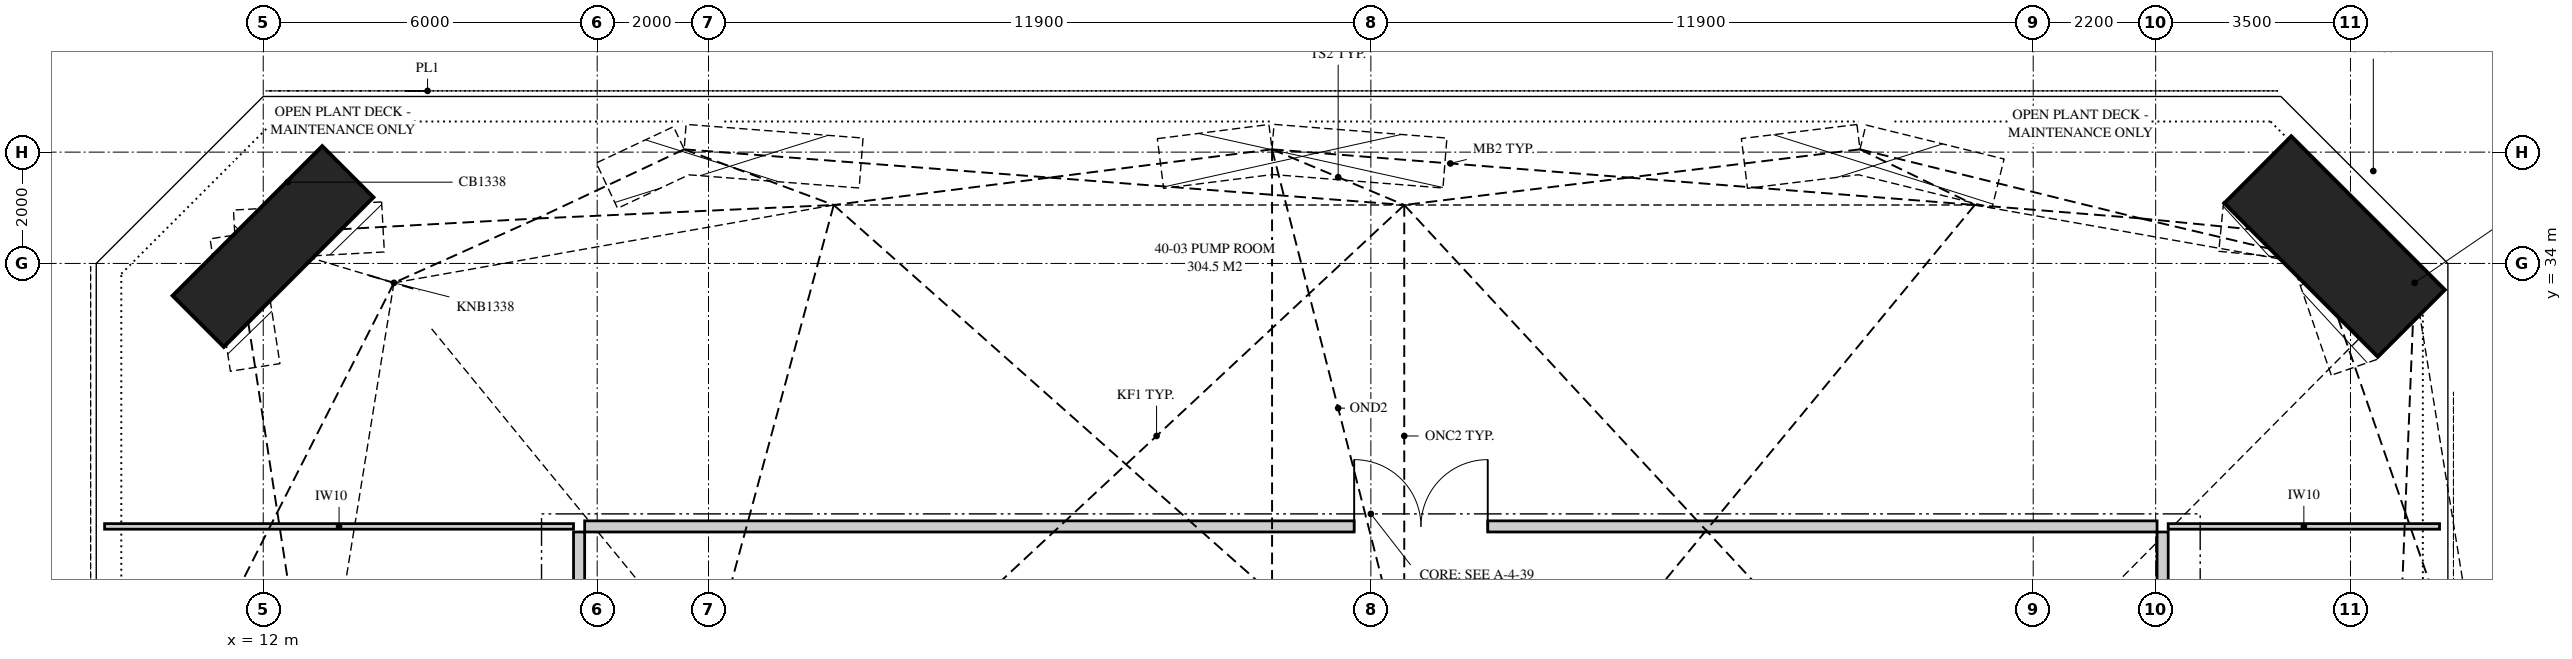
"""IFC4 building model, lengths in metres.
Left out: names, types, materials, properties, quantities, classifications, styles, units other than length and angle.
Written with IfcOpenShell. Run it as: python <this file> out.ifc"""

import sys

from ifc_helpers import new_model, si_unit, direction, frame, frame_2d, origin, origin_2d, place, context, subcontext, project, spatial, polyline, rectangle, hollow_rectangle, outline, extrude, element, fill, save


model = new_model("IFC4")
c1 = context("Model", 3, precision=1e-05, world=origin(), true_north=direction((0.0, 1.0)))
c2 = subcontext(c1, "Body", "Model", "MODEL_VIEW")
j1 = project(units=[si_unit("LENGTHUNIT", "METRE"), si_unit("PLANEANGLEUNIT", "RADIAN")], contexts=[c1])
p1 = place(None, origin())
s1 = spatial("IfcSite", under=j1, at=p1, CompositionType="ELEMENT")
p2 = place(p1, origin())
s2 = spatial("IfcBuilding", under=s1, at=p2, CompositionType="ELEMENT")
p3 = place(p2, frame((0.0, 0.0, 149.35)))
s3 = spatial("IfcBuildingStorey", under=s2, at=p3, CompositionType="ELEMENT", Elevation=149.35)
p4 = place(p3, frame((48.76, 34.51, 0.0), z_axis=(0.349369254051, -0.158541855607, 0.923474744833), x_axis=(-0.665986145367, -0.735293584717, 0.125721113791)))
e1 = element("IfcColumn", 1, at=p4, inside=s3, PredefinedType="COLUMN", context=c2, shape_type="SweptSolid", body=[
    extrude(hollow_rectangle(XDim=1.7, YDim=3.9, WallThickness=0.125, at=origin_2d()), origin(), (0.0, 0.0, 1.0), 4.533),
])
p5 = place(p3, frame((11.49, 34.51, 0.0), z_axis=(0.490881006736, -0.147415239126, 0.858664419025), x_axis=(0.544149142602, -0.717824668792, -0.434314926614)))
e2 = element("IfcColumn", 2, at=p5, inside=s3, PredefinedType="COLUMN", context=c2, shape_type="SweptSolid", body=[
    extrude(hollow_rectangle(XDim=1.3, YDim=3.8, WallThickness=0.125, at=origin_2d()), origin(), (0.0, 0.0, 1.0), 4.892),
])
p6 = place(p3, frame((17.775, 29.275, 0.0), z_axis=(0.0, 0.0, 1.0), x_axis=(1.0, 0.0, 0.0)))
e3 = element("IfcWall", 3, at=p6, inside=s3, PredefinedType="PARTITIONING", context=c2, shape_type="SweptSolid", body=[
    extrude(outline(polyline([(0.0, 0.0), (28.25, 0.0), (28.25, 2.52), (27.728, 2.52), (27.728, 4.72), (20.598, 4.72), (20.598, 4.141), (19.667, 4.141), (19.667, 4.72), (15.01, 4.72), (15.01, 4.208), (14.44, 4.208), (14.44, 4.72), (11.449, 4.72), (11.449, 4.141), (10.512, 4.141), (10.512, 4.72), (8.986, 4.72), (8.986, 4.141), (8.079, 4.141), (8.079, 4.72), (3.181, 4.72), (3.181, 4.141), (2.638, 4.141), (2.638, 4.72), (0.885, 4.72), (0.885, 2.52), (0.0, 2.52), (0.0, 0.0)]), holes=[polyline([(13.78, 3.239), (13.834, 3.353), (14.381, 3.423), (14.381, 2.917), (14.326, 2.803), (13.78, 2.732), (13.78, 3.239)])]), frame((0.0, 0.1, 0.0), z_axis=(0.0, -1.0, 0.0), x_axis=(1.0, 0.0, 0.0)), (0.0, 0.0, 1.0), 0.2),
])
p7 = place(p6, frame((13.825, 0.0, 0.0)))
e4 = element("IfcOpeningElement", 4, at=p7, cuts=e3, PredefinedType="OPENING", context=c2, shape_type="SweptSolid", body=[
    extrude(rectangle(XDim=2.4, YDim=2.4, at=frame_2d((1.2, 1.2))), frame((0.0, 0.11, 0.0), z_axis=(0.0, -1.0, 0.0), x_axis=(1.0, 0.0, 0.0)), (0.0, 0.0, 1.0), 0.22),
])
p8 = place(p3, frame((17.675, 27.625, 0.0), z_axis=(0.0, 0.0, 1.0), x_axis=(0.0, 1.0, 0.0)))
e5 = element("IfcWall", 5, at=p8, inside=s3, PredefinedType="PARTITIONING", context=c2, shape_type="SweptSolid", body=[
    extrude(outline(polyline([(0.0, 0.0), (1.55, 0.0), (1.55, 2.52), (1.053, 2.52), (1.053, 4.72), (0.0, 4.72), (0.0, 0.0)])), frame((0.0, 0.1, 0.0), z_axis=(0.0, -1.0, 0.0), x_axis=(1.0, 0.0, 0.0)), (0.0, 0.0, 1.0), 0.2),
])
p9 = place(p3, frame((46.125, 27.625, 0.0), z_axis=(0.0, 0.0, 1.0), x_axis=(0.0, 1.0, 0.0)))
e6 = element("IfcWall", 6, at=p9, inside=s3, PredefinedType="PARTITIONING", context=c2, shape_type="SweptSolid", body=[
    extrude(outline(polyline([(0.0, 0.0), (1.55, 0.0), (1.55, 2.52), (0.656, 2.52), (0.656, 4.72), (0.0, 4.72), (0.0, 0.0)])), frame((0.0, 0.1, 0.0), z_axis=(0.0, -1.0, 0.0), x_axis=(1.0, 0.0, 0.0)), (0.0, 0.0, 1.0), 0.2),
])
p10 = place(p3, frame((9.15, 29.275, 0.0), z_axis=(0.0, 0.0, 1.0), x_axis=(1.0, 0.0, 0.0)))
e7 = element("IfcWall", 7, at=p10, inside=s3, PredefinedType="PARTITIONING", context=c2, shape_type="SweptSolid", body=[
    extrude(outline(polyline([(3.62, 4.72), (0.0, 4.72), (0.0, 0.0), (8.425, 0.0), (8.425, 2.52), (8.095, 2.52), (8.095, 4.72), (5.362, 4.72), (5.362, 3.5), (3.62, 3.5), (3.62, 4.72)]), holes=[polyline([(2.49, 1.124), (2.49, 2.04), (2.545, 2.104), (2.721, 2.144), (2.721, 2.396), (2.739, 2.457), (3.566, 2.522), (3.566, 1.608), (3.548, 1.548), (3.458, 1.541), (3.458, 1.4), (3.403, 1.337), (2.49, 1.124)])]), frame((0.0, 0.05, 0.0), z_axis=(0.0, -1.0, 0.0), x_axis=(1.0, 0.0, 0.0)), (0.0, 0.0, 1.0), 0.1),
])
p11 = place(p3, frame((46.225, 29.275, 0.0), z_axis=(0.0, 0.0, 1.0), x_axis=(1.0, 0.0, 0.0)))
e8 = element("IfcWall", 8, at=p11, inside=s3, PredefinedType="PARTITIONING", context=c2, shape_type="SweptSolid", body=[
    extrude(outline(polyline([(0.836, 2.52), (0.0, 2.52), (0.0, 0.0), (4.875, 0.0), (4.875, 1.5), (4.66, 1.5), (4.66, 1.297), (4.656, 1.229), (3.836, 1.21), (3.836, 2.145), (3.841, 2.212), (3.896, 2.213), (3.896, 2.357), (3.935, 2.416), (4.797, 2.556), (4.875, 2.556), (4.875, 3.5), (4.263, 3.5), (4.263, 4.72), (0.836, 4.72), (0.836, 2.52)])), frame((0.0, 0.05, 0.0), z_axis=(0.0, -1.0, 0.0), x_axis=(1.0, 0.0, 0.0)), (0.0, 0.0, 1.0), 0.1),
])
p12 = place(p7, origin())
e9 = element("IfcDoor", 9, at=p12, inside=s3, OperationType="DOUBLE_DOOR_SINGLE_SWING", PredefinedType="DOOR", context=c2, shape_type="SweptSolid", body=[
    extrude(rectangle(XDim=2.4, YDim=2.4, at=frame_2d((1.2, 1.2))), frame((0.0, 0.025, 0.0), z_axis=(0.0, -1.0, 0.0), x_axis=(1.0, 0.0, 0.0)), (0.0, 0.0, 1.0), 0.05),
])
fill(e4, e9)
save(model, sys.argv[1])
